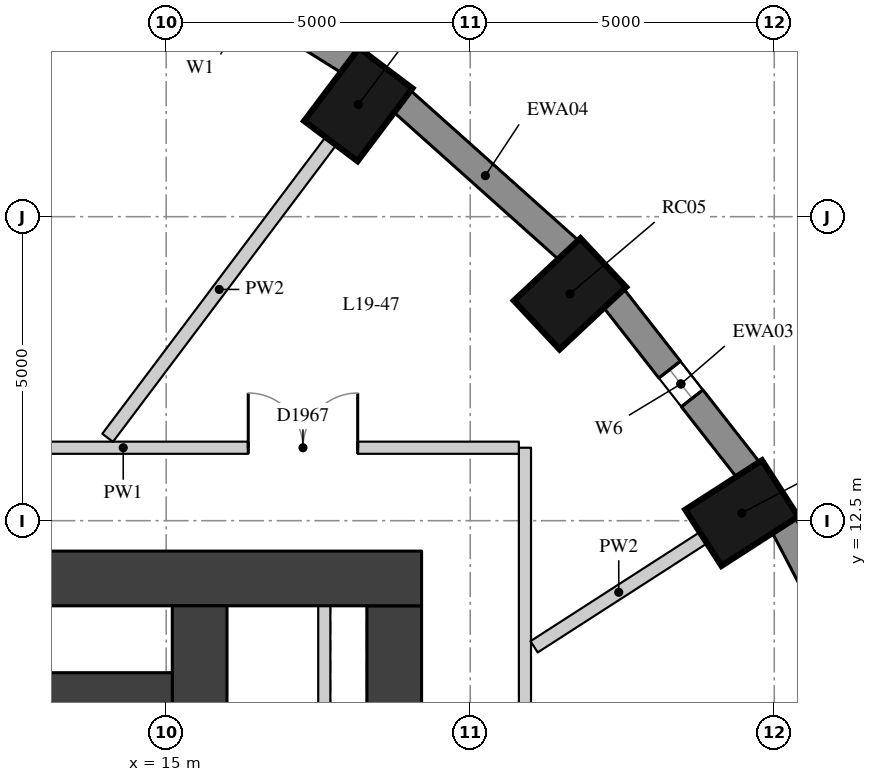
"""IFC4 building model, lengths in metres.
Left out: names, types, materials, properties, quantities, classifications, styles, units other than length and angle.
Written with IfcOpenShell. Run it as: python <this file> out.ifc"""

import sys

from ifc_helpers import new_model, si_unit, direction, frame, frame_2d, origin, origin_2d, place, context, subcontext, project, spatial, rectangle, extrude, element, fill, save


model = new_model("IFC4")
c1 = context("Model", 3, precision=1e-05, world=origin(), true_north=direction((0.0, 1.0)))
c2 = subcontext(c1, "Body", "Model", "MODEL_VIEW")
j1 = project(units=[si_unit("LENGTHUNIT", "METRE"), si_unit("PLANEANGLEUNIT", "RADIAN")], contexts=[c1])
p1 = place(None, origin())
s1 = spatial("IfcSite", under=j1, at=p1, CompositionType="ELEMENT")
p2 = place(p1, origin())
s2 = spatial("IfcBuilding", under=s1, at=p2, CompositionType="ELEMENT")
p3 = place(p2, frame((0.0, 0.0, 71.2)))
s3 = spatial("IfcBuildingStorey", under=s2, at=p3, CompositionType="ELEMENT", Elevation=71.2)
for number, where, z_axis, x_axis in (
    (1, (24.465, 12.625, 0.0), (0.0, 0.0, 1.0), (0.841, 0.541, 0.0)),
    (2, (21.641, 16.23, 0.0), (0.0, 0.0, 1.0), (0.73, 0.683, 0.0)),
    (3, (18.159, 19.343, 0.0), (0.0, 0.0, 1.0), (0.601, 0.799, 0.0)),
):
    element("IfcColumn", number, at=place(p3, frame(where, z_axis=z_axis, x_axis=x_axis)), inside=s3, PredefinedType="COLUMN", context=c2, shape_type="SweptSolid", body=[
        extrude(rectangle(XDim=1.5, YDim=1.1, at=origin_2d()), origin(), (0.0, 0.0, 1.0), 3.3),
    ])
p4 = place(p3, frame((26.786, 9.305, 0.0), z_axis=(0.0, 0.0, 1.0), x_axis=(-0.462492775226, 0.886623050041, 0.0)))
e4 = element("IfcWall", 4, at=p4, inside=s3, PredefinedType="SOLIDWALL", context=c2, shape_type="SweptSolid", body=[
    extrude(rectangle(XDim=3.532, YDim=0.45, at=frame_2d((1.766, 0.0))), origin(), (0.0, 0.0, 1.0), 3.02),
])
p5 = place(p3, frame((24.578, 13.328, 0.0), z_axis=(0.0, 0.0, 1.0), x_axis=(-0.616661975264, 0.787228053529, 0.0)))
e5 = element("IfcWall", 5, at=p5, inside=s3, PredefinedType="SOLIDWALL", context=c2, shape_type="SweptSolid", body=[
    extrude(rectangle(XDim=3.61, YDim=0.45, at=frame_2d((1.805, 0.0))), origin(), (0.0, 0.0, 1.0), 3.02),
])
p6 = place(p5, frame((1.505, 0.0, 0.4)))
e6 = element("IfcOpeningElement", 6, at=p6, cuts=e5, PredefinedType="OPENING", context=c2, shape_type="SweptSolid", body=[
    extrude(rectangle(XDim=0.6, YDim=1.75, at=frame_2d((0.3, 0.875))), frame((0.0, 0.235, 0.0), z_axis=(0.0, -1.0, 0.0), x_axis=(1.0, 0.0, 0.0)), (0.0, 0.0, 1.0), 0.47),
])
p7 = place(p3, frame((21.627, 16.943, 0.0), z_axis=(0.0, 0.0, 1.0), x_axis=(-0.745526233716, 0.66647628228, 0.0)))
e7 = element("IfcWall", 7, at=p7, inside=s3, PredefinedType="SOLIDWALL", context=c2, shape_type="SweptSolid", body=[
    extrude(rectangle(XDim=3.697, YDim=0.45, at=frame_2d((1.848, 0.0))), origin(), (0.0, 0.0, 1.0), 3.02),
])
p8 = place(p3, frame((18.023, 20.044, 0.0), z_axis=(0.0, 0.0, 1.0), x_axis=(-0.847635480093, 0.530579016629, 0.0)))
e8 = element("IfcWall", 8, at=p8, inside=s3, PredefinedType="SOLIDWALL", context=c2, shape_type="SweptSolid", body=[
    extrude(rectangle(XDim=3.782, YDim=0.45, at=frame_2d((1.891, 0.0))), origin(), (0.0, 0.0, 1.0), 3.02),
])
p9 = place(p8, frame((0.791, 0.0, 0.4)))
e9 = element("IfcOpeningElement", 9, at=p9, cuts=e8, PredefinedType="OPENING", context=c2, shape_type="SweptSolid", body=[
    extrude(rectangle(XDim=2.2, YDim=1.75, at=frame_2d((1.1, 0.875))), frame((0.0, 0.235, 0.0), z_axis=(0.0, -1.0, 0.0), x_axis=(1.0, 0.0, 0.0)), (0.0, 0.0, 1.0), 0.47),
])
p10 = place(p3, frame((18.75, -11.1, 0.0), z_axis=(0.0, 0.0, 1.0), x_axis=(0.0, 1.0, 0.0)))
e10 = element("IfcWall", 10, at=p10, inside=s3, PredefinedType="SHEAR", context=c2, shape_type="SweptSolid", body=[
    extrude(rectangle(XDim=22.2, YDim=0.9, at=frame_2d((11.1, 0.0))), origin(), (0.0, 0.0, 1.0), 3.02),
])
p11 = place(p10, frame((15.675, 0.0, 0.0)))
e11 = element("IfcOpeningElement", 11, at=p11, cuts=e10, PredefinedType="OPENING", context=c2, shape_type="SweptSolid", body=[
    extrude(rectangle(XDim=1.5, YDim=2.1, at=frame_2d((0.75, 1.05))), frame((0.0, 0.46, 0.0), z_axis=(0.0, -1.0, 0.0), x_axis=(1.0, 0.0, 0.0)), (0.0, 0.0, 1.0), 0.92),
])
p12 = place(p10, frame((4.775, 0.0, 0.0)))
e12 = element("IfcOpeningElement", 12, at=p12, cuts=e10, PredefinedType="OPENING", context=c2, shape_type="SweptSolid", body=[
    extrude(rectangle(XDim=1.5, YDim=2.1, at=frame_2d((0.75, 1.05))), frame((0.0, 0.46, 0.0), z_axis=(0.0, -1.0, 0.0), x_axis=(1.0, 0.0, 0.0)), (0.0, 0.0, 1.0), 0.92),
])
p13 = place(p3, frame((4.0, 11.55, 0.0), z_axis=(0.0, 0.0, 1.0), x_axis=(1.0, 0.0, 0.0)))
e13 = element("IfcWall", 13, at=p13, inside=s3, PredefinedType="SHEAR", context=c2, shape_type="SweptSolid", body=[
    extrude(rectangle(XDim=15.2, YDim=0.9, at=frame_2d((7.6, 0.0))), origin(), (0.0, 0.0, 1.0), 3.02),
])
p14 = place(p3, frame((15.55, -11.1, 0.0), z_axis=(0.0, 0.0, 1.0), x_axis=(0.0, 1.0, 0.0)))
e14 = element("IfcWall", 14, at=p14, inside=s3, PredefinedType="SHEAR", context=c2, shape_type="SweptSolid", body=[
    extrude(rectangle(XDim=22.2, YDim=0.9, at=frame_2d((11.1, 0.0))), origin(), (0.0, 0.0, 1.0), 3.02),
])
p15 = place(p14, frame((15.6, 0.0, 0.0)))
e15 = element("IfcOpeningElement", 15, at=p15, cuts=e14, PredefinedType="OPENING", context=c2, shape_type="SweptSolid", body=[
    extrude(rectangle(XDim=1.0, YDim=2.1, at=frame_2d((0.5, 1.05))), frame((0.0, 0.46, 0.0), z_axis=(0.0, -1.0, 0.0), x_axis=(1.0, 0.0, 0.0)), (0.0, 0.0, 1.0), 0.92),
])
p16 = place(p14, frame((5.6, 0.0, 0.0)))
e16 = element("IfcOpeningElement", 16, at=p16, cuts=e14, PredefinedType="OPENING", context=c2, shape_type="SweptSolid", body=[
    extrude(rectangle(XDim=1.0, YDim=2.1, at=frame_2d((0.5, 1.05))), frame((0.0, 0.46, 0.0), z_axis=(0.0, -1.0, 0.0), x_axis=(1.0, 0.0, 0.0)), (0.0, 0.0, 1.0), 0.92),
])
p17 = place(p3, frame((4.9, 9.55, 0.0), z_axis=(0.0, 0.0, 1.0), x_axis=(1.0, 0.0, 0.0)))
e17 = element("IfcWall", 17, at=p17, inside=s3, PredefinedType="SHEAR", context=c2, shape_type="SweptSolid", body=[
    extrude(rectangle(XDim=10.2, YDim=0.9, at=frame_2d((5.1, 0.0))), origin(), (0.0, 0.0, 1.0), 3.02),
])
p18 = place(p3, frame((17.6, 6.4, 0.0), z_axis=(0.0, 0.0, 1.0), x_axis=(0.0, 1.0, 0.0)))
e18 = element("IfcWall", 18, at=p18, inside=s3, PredefinedType="PARTITIONING", context=c2, shape_type="SweptSolid", body=[
    extrude(rectangle(XDim=4.7, YDim=0.2, at=frame_2d((2.35, 0.0))), origin(), (0.0, 0.0, 1.0), 3.02),
])
p19 = place(p3, frame((20.9, 13.7, 0.0), z_axis=(0.0, 0.0, 1.0), x_axis=(0.0, -1.0, 0.0)))
e19 = element("IfcWall", 19, at=p19, inside=s3, PredefinedType="PARTITIONING", context=c2, shape_type="SweptSolid", body=[
    extrude(rectangle(XDim=27.4, YDim=0.2, at=frame_2d((13.7, 0.0))), origin(), (0.0, 0.0, 1.0), 3.02),
])
p20 = place(p19, frame((16.523, 0.0, 0.0)))
e20 = element("IfcOpeningElement", 20, at=p20, cuts=e19, PredefinedType="OPENING", context=c2, shape_type="SweptSolid", body=[
    extrude(rectangle(XDim=0.9, YDim=2.1, at=frame_2d((0.45, 1.05))), frame((0.0, 0.11, 0.0), z_axis=(0.0, -1.0, 0.0), x_axis=(1.0, 0.0, 0.0)), (0.0, 0.0, 1.0), 0.22),
])
p21 = place(p19, frame((7.635, 0.0, 0.0)))
e21 = element("IfcOpeningElement", 21, at=p21, cuts=e19, PredefinedType="OPENING", context=c2, shape_type="SweptSolid", body=[
    extrude(rectangle(XDim=1.8, YDim=2.1, at=frame_2d((0.9, 1.05))), frame((0.0, 0.11, 0.0), z_axis=(0.0, -1.0, 0.0), x_axis=(1.0, 0.0, 0.0)), (0.0, 0.0, 1.0), 0.22),
])
p22 = place(p3, frame((7.787, 13.7, 0.0), z_axis=(0.0, 0.0, 1.0), x_axis=(1.0, 0.0, 0.0)))
e22 = element("IfcWall", 22, at=p22, inside=s3, PredefinedType="PARTITIONING", context=c2, shape_type="SweptSolid", body=[
    extrude(rectangle(XDim=13.013, YDim=0.2, at=frame_2d((6.506, 0.0))), origin(), (0.0, 0.0, 1.0), 3.02),
])
p23 = place(p22, frame((1.583, 0.0, 0.0)))
e23 = element("IfcOpeningElement", 23, at=p23, cuts=e22, PredefinedType="OPENING", context=c2, shape_type="SweptSolid", body=[
    extrude(rectangle(XDim=1.1, YDim=2.1, at=frame_2d((0.55, 1.05))), frame((0.0, 0.11, 0.0), z_axis=(0.0, -1.0, 0.0), x_axis=(1.0, 0.0, 0.0)), (0.0, 0.0, 1.0), 0.22),
])
p24 = place(p22, frame((8.562, 0.0, 0.0)))
e24 = element("IfcOpeningElement", 24, at=p24, cuts=e22, PredefinedType="OPENING", context=c2, shape_type="SweptSolid", body=[
    extrude(rectangle(XDim=1.8, YDim=2.1, at=frame_2d((0.9, 1.05))), frame((0.0, 0.11, 0.0), z_axis=(0.0, -1.0, 0.0), x_axis=(1.0, 0.0, 0.0)), (0.0, 0.0, 1.0), 0.22),
])
p25 = place(p3, frame((23.835, 12.219, 0.0), z_axis=(0.0, 0.0, 1.0), x_axis=(-0.840713483419, -0.541480229368, 0.0)))
e25 = element("IfcWall", 25, at=p25, inside=s3, PredefinedType="PARTITIONING", context=c2, shape_type="SweptSolid", body=[
    extrude(rectangle(XDim=3.312, YDim=0.22, at=frame_2d((1.656, 0.0))), origin(), (0.0, 0.0, 1.0), 3.02),
])
p26 = place(p3, frame((17.708, 18.743, 0.0), z_axis=(0.0, 0.0, 1.0), x_axis=(-0.601170031872, -0.799121137738, 0.0)))
e26 = element("IfcWall", 26, at=p26, inside=s3, PredefinedType="PARTITIONING", context=c2, shape_type="SweptSolid", body=[
    extrude(rectangle(XDim=6.106, YDim=0.22, at=frame_2d((3.053, 0.0))), origin(), (0.0, 0.0, 1.0), 3.02),
])
p27 = place(p6, origin())
e27 = element("IfcWindow", 27, at=p27, inside=s3, PartitioningType="SINGLE_PANEL", PredefinedType="WINDOW", context=c2, shape_type="SweptSolid", body=[
    extrude(rectangle(XDim=0.6, YDim=1.75, at=frame_2d((0.3, 0.875))), frame((0.0, 0.035, 0.0), z_axis=(0.0, -1.0, 0.0), x_axis=(1.0, 0.0, 0.0)), (0.0, 0.0, 1.0), 0.06),
])
fill(e6, e27)
p28 = place(p24, origin())
e28 = element("IfcDoor", 28, at=p28, inside=s3, OperationType="DOUBLE_DOOR_SINGLE_SWING", PredefinedType="DOOR", context=c2, shape_type="SweptSolid", body=[
    extrude(rectangle(XDim=1.8, YDim=2.1, at=frame_2d((0.9, 1.05))), frame((0.0, 0.025, 0.0), z_axis=(0.0, -1.0, 0.0), x_axis=(1.0, 0.0, 0.0)), (0.0, 0.0, 1.0), 0.05),
])
fill(e24, e28)
save(model, sys.argv[1])
